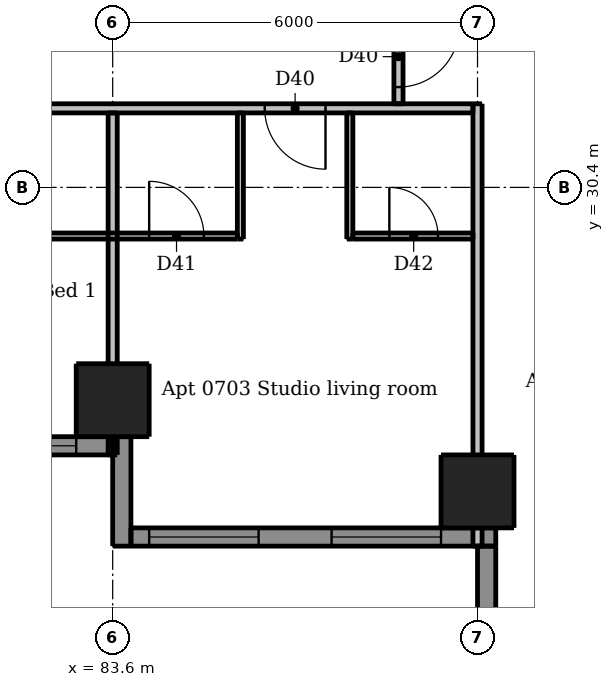
"""IFC4 building model, lengths in metres.
Left out: names, types, materials, properties, quantities, classifications, styles, units other than length and angle.
Written with IfcOpenShell. Run it as: python <this file> out.ifc"""

import sys

from ifc_helpers import new_model, si_unit, direction, frame, frame_2d, origin, origin_2d, place, context, subcontext, project, spatial, rectangle, extrude, element, fill, save


model = new_model("IFC4")
c1 = context("Model", 3, precision=1e-05, world=origin(), true_north=direction((0.0, 1.0)))
c2 = subcontext(c1, "Body", "Model", "MODEL_VIEW")
j1 = project(units=[si_unit("LENGTHUNIT", "METRE"), si_unit("PLANEANGLEUNIT", "RADIAN")], contexts=[c1])
p1 = place(None, origin())
s1 = spatial("IfcSite", under=j1, at=p1, CompositionType="ELEMENT")
p2 = place(p1, origin())
s2 = spatial("IfcBuilding", under=s1, at=p2, CompositionType="ELEMENT")
p3 = place(p2, frame((0.0, 0.0, 30.1)))
s3 = spatial("IfcBuildingStorey", under=s2, at=p3, CompositionType="ELEMENT", Elevation=30.1)
for number, where, z_axis, x_axis in (
    (1, (83.6, 26.9, 0.0), (0.0, 0.0, 1.0), (1.0, 0.0, 0.0)),
    (2, (89.6, 25.4, 0.0), (0.0, 0.0, 1.0), (1.0, 0.0, 0.0)),
):
    element("IfcColumn", number, at=place(p3, frame(where, z_axis=z_axis, x_axis=x_axis)), inside=s3, PredefinedType="COLUMN", context=c2, shape_type="SweptSolid", body=[
        extrude(rectangle(XDim=1.2, YDim=1.2, at=origin_2d()), origin(), (0.0, 0.0, 1.0), 3.05),
    ])
p4 = place(p3, frame((83.75, 26.3, 0.0), z_axis=(0.0, 0.0, 1.0), x_axis=(0.0, -1.0, 0.0)))
e3 = element("IfcWall", 3, at=p4, inside=s3, PredefinedType="SOLIDWALL", context=c2, shape_type="SweptSolid", body=[
    extrude(rectangle(XDim=1.8, YDim=0.3, at=frame_2d((0.9, 0.0))), origin(), (0.0, 0.0, 1.0), 3.05),
])
p5 = place(p3, frame((89.75, 24.5, 0.0), z_axis=(0.0, 0.0, 1.0), x_axis=(0.0, -1.0, 0.0)))
e4 = element("IfcWall", 4, at=p5, inside=s3, PredefinedType="SOLIDWALL", context=c2, shape_type="SweptSolid", body=[
    extrude(rectangle(XDim=4.5, YDim=0.3, at=frame_2d((2.25, 0.0))), origin(), (0.0, 0.0, 1.0), 3.05),
])
p6 = place(p5, frame((1.05, 0.0, 0.15)))
e5 = element("IfcOpeningElement", 5, at=p6, cuts=e4, PredefinedType="OPENING", context=c2, shape_type="SweptSolid", body=[
    extrude(rectangle(XDim=2.4, YDim=2.1, at=frame_2d((1.2, 1.05))), frame((0.0, 0.16, 0.0), z_axis=(0.0, -1.0, 0.0), x_axis=(1.0, 0.0, 0.0)), (0.0, 0.0, 1.0), 0.32),
])
p7 = place(p3, frame((77.6, 26.15, 0.0), z_axis=(0.0, 0.0, 1.0), x_axis=(1.0, 0.0, 0.0)))
e6 = element("IfcWall", 6, at=p7, inside=s3, PredefinedType="SOLIDWALL", context=c2, shape_type="SweptSolid", body=[
    extrude(rectangle(XDim=6.0, YDim=0.3, at=frame_2d((3.0, 0.0))), origin(), (0.0, 0.0, 1.0), 3.05),
])
p8 = place(p7, frame((0.6, 0.0, 0.15)))
e7 = element("IfcOpeningElement", 7, at=p8, cuts=e6, PredefinedType="OPENING", context=c2, shape_type="SweptSolid", body=[
    extrude(rectangle(XDim=1.8, YDim=2.1, at=frame_2d((0.9, 1.05))), frame((0.0, 0.16, 0.0), z_axis=(0.0, -1.0, 0.0), x_axis=(1.0, 0.0, 0.0)), (0.0, 0.0, 1.0), 0.32),
])
p9 = place(p7, frame((3.6, 0.0, 0.15)))
e8 = element("IfcOpeningElement", 8, at=p9, cuts=e6, PredefinedType="OPENING", context=c2, shape_type="SweptSolid", body=[
    extrude(rectangle(XDim=1.8, YDim=2.1, at=frame_2d((0.9, 1.05))), frame((0.0, 0.16, 0.0), z_axis=(0.0, -1.0, 0.0), x_axis=(1.0, 0.0, 0.0)), (0.0, 0.0, 1.0), 0.32),
])
p10 = place(p3, frame((83.9, 24.65, 0.0), z_axis=(0.0, 0.0, 1.0), x_axis=(1.0, 0.0, 0.0)))
e9 = element("IfcWall", 9, at=p10, inside=s3, PredefinedType="SOLIDWALL", context=c2, shape_type="SweptSolid", body=[
    extrude(rectangle(XDim=6.0, YDim=0.3, at=frame_2d((3.0, 0.0))), origin(), (0.0, 0.0, 1.0), 3.05),
])
p11 = place(p10, frame((0.3, 0.0, 0.15)))
e10 = element("IfcOpeningElement", 10, at=p11, cuts=e9, PredefinedType="OPENING", context=c2, shape_type="SweptSolid", body=[
    extrude(rectangle(XDim=1.8, YDim=2.1, at=frame_2d((0.9, 1.05))), frame((0.0, 0.16, 0.0), z_axis=(0.0, -1.0, 0.0), x_axis=(1.0, 0.0, 0.0)), (0.0, 0.0, 1.0), 0.32),
])
p12 = place(p10, frame((3.3, 0.0, 0.15)))
e11 = element("IfcOpeningElement", 11, at=p12, cuts=e9, PredefinedType="OPENING", context=c2, shape_type="SweptSolid", body=[
    extrude(rectangle(XDim=1.8, YDim=2.1, at=frame_2d((0.9, 1.05))), frame((0.0, 0.16, 0.0), z_axis=(0.0, -1.0, 0.0), x_axis=(1.0, 0.0, 0.0)), (0.0, 0.0, 1.0), 0.32),
])
for number, where, z_axis, x_axis in (
    (12, (85.7, 29.55, 0.0), (0.0, 0.0, 1.0), (0.0, 1.0, 0.0)),
    (13, (87.5, 29.55, 0.0), (0.0, 0.0, 1.0), (0.0, 1.0, 0.0)),
):
    element("IfcWall", number, at=place(p3, frame(where, z_axis=z_axis, x_axis=x_axis)), inside=s3, PredefinedType="PARTITIONING", context=c2, shape_type="SweptSolid", body=[
        extrude(rectangle(XDim=2.075, YDim=0.1, at=frame_2d((1.038, 0.0))), origin(), (0.0, 0.0, 1.0), 3.05),
    ])
p13 = place(p3, frame((80.65, 29.6, 0.0), z_axis=(0.0, 0.0, 1.0), x_axis=(1.0, 0.0, 0.0)))
e14 = element("IfcWall", 14, at=p13, inside=s3, PredefinedType="PARTITIONING", context=c2, shape_type="SweptSolid", body=[
    extrude(rectangle(XDim=5.0, YDim=0.1, at=frame_2d((2.5, 0.0))), origin(), (0.0, 0.0, 1.0), 3.05),
])
p14 = place(p13, frame((3.55, 0.0, 0.0)))
e15 = element("IfcOpeningElement", 15, at=p14, cuts=e14, PredefinedType="OPENING", context=c2, shape_type="SweptSolid", body=[
    extrude(rectangle(XDim=0.9, YDim=2.1, at=frame_2d((0.45, 1.05))), frame((0.0, 0.06, 0.0), z_axis=(0.0, -1.0, 0.0), x_axis=(1.0, 0.0, 0.0)), (0.0, 0.0, 1.0), 0.12),
])
p15 = place(p3, frame((87.55, 29.6, 0.0), z_axis=(0.0, 0.0, 1.0), x_axis=(1.0, 0.0, 0.0)))
e16 = element("IfcWall", 16, at=p15, inside=s3, PredefinedType="PARTITIONING", context=c2, shape_type="SweptSolid", body=[
    extrude(rectangle(XDim=1.975, YDim=0.1, at=frame_2d((0.987, 0.0))), origin(), (0.0, 0.0, 1.0), 3.05),
])
p16 = place(p15, frame((0.6, 0.0, 0.0)))
e17 = element("IfcOpeningElement", 17, at=p16, cuts=e16, PredefinedType="OPENING", context=c2, shape_type="SweptSolid", body=[
    extrude(rectangle(XDim=0.8, YDim=2.1, at=frame_2d((0.4, 1.05))), frame((0.0, 0.06, 0.0), z_axis=(0.0, -1.0, 0.0), x_axis=(1.0, 0.0, 0.0)), (0.0, 0.0, 1.0), 0.12),
])
p17 = place(p3, frame((83.6, 26.0, 0.0), z_axis=(0.0, 0.0, 1.0), x_axis=(0.0, 1.0, 0.0)))
e18 = element("IfcWall", 18, at=p17, inside=s3, PredefinedType="PARTITIONING", context=c2, shape_type="SweptSolid", body=[
    extrude(rectangle(XDim=5.625, YDim=0.15, at=frame_2d((2.812, 0.0))), origin(), (0.0, 0.0, 1.0), 2.647),
])
p18 = place(p3, frame((88.3, 60.475, 0.0), z_axis=(0.0, 0.0, 1.0), x_axis=(0.0, -1.0, 0.0)))
e19 = element("IfcWall", 19, at=p18, inside=s3, PredefinedType="PARTITIONING", context=c2, shape_type="SweptSolid", body=[
    extrude(rectangle(XDim=28.7, YDim=0.15, at=frame_2d((14.35, 0.0))), origin(), (0.0, 0.0, 1.0), 3.05),
])
p19 = place(p18, frame((27.425, 0.0, 0.0)))
e20 = element("IfcOpeningElement", 20, at=p19, cuts=e19, PredefinedType="OPENING", context=c2, shape_type="SweptSolid", body=[
    extrude(rectangle(XDim=1.0, YDim=2.1, at=frame_2d((0.5, 1.05))), frame((0.0, 0.085, 0.0), z_axis=(0.0, -1.0, 0.0), x_axis=(1.0, 0.0, 0.0)), (0.0, 0.0, 1.0), 0.17),
])
p20 = place(p18, frame((16.325, 0.0, 0.0)))
e21 = element("IfcOpeningElement", 21, at=p20, cuts=e19, PredefinedType="OPENING", context=c2, shape_type="SweptSolid", body=[
    extrude(rectangle(XDim=1.0, YDim=2.1, at=frame_2d((0.5, 1.05))), frame((0.0, 0.085, 0.0), z_axis=(0.0, -1.0, 0.0), x_axis=(1.0, 0.0, 0.0)), (0.0, 0.0, 1.0), 0.17),
])
p21 = place(p18, frame((5.525, 0.0, 0.0)))
e22 = element("IfcOpeningElement", 22, at=p21, cuts=e19, PredefinedType="OPENING", context=c2, shape_type="SweptSolid", body=[
    extrude(rectangle(XDim=1.0, YDim=2.1, at=frame_2d((0.5, 1.05))), frame((0.0, 0.085, 0.0), z_axis=(0.0, -1.0, 0.0), x_axis=(1.0, 0.0, 0.0)), (0.0, 0.0, 1.0), 0.17),
])
p22 = place(p3, frame((89.6, 24.5, 0.0), z_axis=(0.0, 0.0, 1.0), x_axis=(0.0, 1.0, 0.0)))
e23 = element("IfcWall", 23, at=p22, inside=s3, PredefinedType="PARTITIONING", context=c2, shape_type="SweptSolid", body=[
    extrude(rectangle(XDim=7.275, YDim=0.15, at=frame_2d((3.637, 0.0))), origin(), (0.0, 0.0, 1.0), 2.516),
])
p23 = place(p3, frame((89.525, 31.7, 0.0), z_axis=(0.0, 0.0, 1.0), x_axis=(-1.0, 0.0, 0.0)))
e24 = element("IfcWall", 24, at=p23, inside=s3, PredefinedType="PARTITIONING", context=c2, shape_type="SweptSolid", body=[
    extrude(rectangle(XDim=28.75, YDim=0.15, at=frame_2d((14.375, 0.0))), origin(), (0.0, 0.0, 1.0), 3.05),
])
p24 = place(p23, frame((24.625, 0.0, 0.0)))
e25 = element("IfcOpeningElement", 25, at=p24, cuts=e24, PredefinedType="OPENING", context=c2, shape_type="SweptSolid", body=[
    extrude(rectangle(XDim=1.0, YDim=2.1, at=frame_2d((0.5, 1.05))), frame((0.0, 0.085, 0.0), z_axis=(0.0, -1.0, 0.0), x_axis=(1.0, 0.0, 0.0)), (0.0, 0.0, 1.0), 0.17),
])
p25 = place(p23, frame((10.225, 0.0, 0.0)))
e26 = element("IfcOpeningElement", 26, at=p25, cuts=e24, PredefinedType="OPENING", context=c2, shape_type="SweptSolid", body=[
    extrude(rectangle(XDim=1.0, YDim=2.1, at=frame_2d((0.5, 1.05))), frame((0.0, 0.085, 0.0), z_axis=(0.0, -1.0, 0.0), x_axis=(1.0, 0.0, 0.0)), (0.0, 0.0, 1.0), 0.17),
])
p26 = place(p23, frame((2.425, 0.0, 0.0)))
e27 = element("IfcOpeningElement", 27, at=p26, cuts=e24, PredefinedType="OPENING", context=c2, shape_type="SweptSolid", body=[
    extrude(rectangle(XDim=1.0, YDim=2.1, at=frame_2d((0.5, 1.05))), frame((0.0, 0.085, 0.0), z_axis=(0.0, -1.0, 0.0), x_axis=(1.0, 0.0, 0.0)), (0.0, 0.0, 1.0), 0.17),
])
p27 = place(p9, origin())
e28 = element("IfcWindow", 28, at=p27, inside=s3, PartitioningType="DOUBLE_PANEL_VERTICAL", PredefinedType="WINDOW", context=c2, shape_type="SweptSolid", body=[
    extrude(rectangle(XDim=1.8, YDim=2.1, at=frame_2d((0.9, 1.05))), frame((0.0, 0.03, 0.0), z_axis=(0.0, -1.0, 0.0), x_axis=(1.0, 0.0, 0.0)), (0.0, 0.0, 1.0), 0.06),
])
fill(e8, e28)
p28 = place(p11, origin())
e29 = element("IfcWindow", 29, at=p28, inside=s3, PartitioningType="DOUBLE_PANEL_VERTICAL", PredefinedType="WINDOW", context=c2, shape_type="SweptSolid", body=[
    extrude(rectangle(XDim=1.8, YDim=2.1, at=frame_2d((0.9, 1.05))), frame((0.0, 0.03, 0.0), z_axis=(0.0, -1.0, 0.0), x_axis=(1.0, 0.0, 0.0)), (0.0, 0.0, 1.0), 0.06),
])
fill(e10, e29)
p29 = place(p12, origin())
e30 = element("IfcWindow", 30, at=p29, inside=s3, PartitioningType="DOUBLE_PANEL_VERTICAL", PredefinedType="WINDOW", context=c2, shape_type="SweptSolid", body=[
    extrude(rectangle(XDim=1.8, YDim=2.1, at=frame_2d((0.9, 1.05))), frame((0.0, 0.03, 0.0), z_axis=(0.0, -1.0, 0.0), x_axis=(1.0, 0.0, 0.0)), (0.0, 0.0, 1.0), 0.06),
])
fill(e11, e30)
p30 = place(p26, origin())
e31 = element("IfcDoor", 31, at=p30, inside=s3, OperationType="SINGLE_SWING_LEFT", PredefinedType="DOOR", context=c2, shape_type="SweptSolid", body=[
    extrude(rectangle(XDim=1.0, YDim=2.1, at=frame_2d((0.5, 1.05))), frame((0.0, 0.025, 0.0), z_axis=(0.0, -1.0, 0.0), x_axis=(1.0, 0.0, 0.0)), (0.0, 0.0, 1.0), 0.05),
])
fill(e27, e31)
p31 = place(p14, origin())
e32 = element("IfcDoor", 32, at=p31, inside=s3, OperationType="SINGLE_SWING_LEFT", PredefinedType="DOOR", context=c2, shape_type="SweptSolid", body=[
    extrude(rectangle(XDim=0.9, YDim=2.1, at=frame_2d((0.45, 1.05))), frame((0.0, 0.025, 0.0), z_axis=(0.0, -1.0, 0.0), x_axis=(1.0, 0.0, 0.0)), (0.0, 0.0, 1.0), 0.05),
])
fill(e15, e32)
p32 = place(p16, origin())
e33 = element("IfcDoor", 33, at=p32, inside=s3, OperationType="SINGLE_SWING_LEFT", PredefinedType="DOOR", context=c2, shape_type="SweptSolid", body=[
    extrude(rectangle(XDim=0.8, YDim=2.1, at=frame_2d((0.4, 1.05))), frame((0.0, 0.025, 0.0), z_axis=(0.0, -1.0, 0.0), x_axis=(1.0, 0.0, 0.0)), (0.0, 0.0, 1.0), 0.05),
])
fill(e17, e33)
p33 = place(p19, origin())
e34 = element("IfcDoor", 34, at=p33, inside=s3, OperationType="SINGLE_SWING_LEFT", PredefinedType="DOOR", context=c2, shape_type="SweptSolid", body=[
    extrude(rectangle(XDim=1.0, YDim=2.1, at=frame_2d((0.5, 1.05))), frame((0.0, 0.025, 0.0), z_axis=(0.0, -1.0, 0.0), x_axis=(1.0, 0.0, 0.0)), (0.0, 0.0, 1.0), 0.05),
])
fill(e20, e34)
save(model, sys.argv[1])
